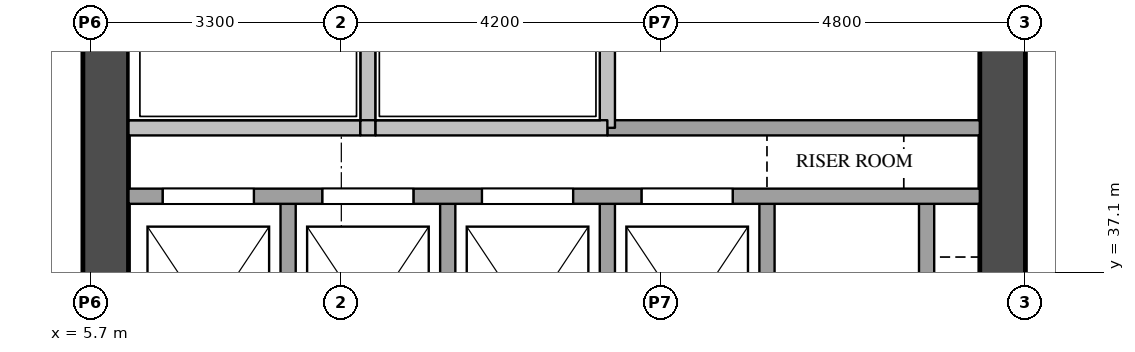
"""IFC4 building model, lengths in metres.
Left out: names, types, materials, properties, quantities, classifications, styles, units other than length and angle.
Written with IfcOpenShell. Run it as: python <this file> out.ifc"""

import sys

from ifc_helpers import new_model, si_unit, direction, frame, frame_2d, origin, place, context, subcontext, project, spatial, rectangle, extrude, element, fill, save


model = new_model("IFC4")
c1 = context("Model", 3, precision=1e-05, world=origin(), true_north=direction((0.0, 1.0)))
c2 = subcontext(c1, "Body", "Model", "MODEL_VIEW")
j1 = project(units=[si_unit("LENGTHUNIT", "METRE"), si_unit("PLANEANGLEUNIT", "RADIAN")], contexts=[c1])
p1 = place(None, origin())
s1 = spatial("IfcSite", under=j1, at=p1, CompositionType="ELEMENT")
p2 = place(p1, origin())
s2 = spatial("IfcBuilding", under=s1, at=p2, CompositionType="ELEMENT")
p3 = place(p2, frame((0.0, 0.0, 108.2)))
s3 = spatial("IfcBuildingStorey", under=s2, at=p3, CompositionType="ELEMENT", Elevation=108.2)
p4 = place(p3, frame((5.9, 29.1, 0.0), z_axis=(0.0, 0.0, 1.0), x_axis=(0.0, 1.0, 0.0)))
e1 = element("IfcWall", 1, at=p4, inside=s3, PredefinedType="SHEAR", context=c2, shape_type="SweptSolid", body=[
    extrude(rectangle(XDim=20.3, YDim=0.6, at=frame_2d((10.15, 0.0))), origin(), (0.0, 0.0, 1.0), 3.5),
])
p5 = place(p4, frame((3.6, 0.0, 0.0)))
e2 = element("IfcOpeningElement", 2, at=p5, cuts=e1, PredefinedType="OPENING", context=c2, shape_type="SweptSolid", body=[
    extrude(rectangle(XDim=1.8, YDim=2.1, at=frame_2d((0.9, 1.05))), frame((0.0, 0.31, 0.0), z_axis=(0.0, -1.0, 0.0), x_axis=(1.0, 0.0, 0.0)), (0.0, 0.0, 1.0), 0.62),
])
p6 = place(p4, frame((16.4, 0.0, 0.0)))
e3 = element("IfcOpeningElement", 3, at=p6, cuts=e1, PredefinedType="OPENING", context=c2, shape_type="SweptSolid", body=[
    extrude(rectangle(XDim=1.0, YDim=2.1, at=frame_2d((0.5, 1.05))), frame((0.0, 0.31, 0.0), z_axis=(0.0, -1.0, 0.0), x_axis=(1.0, 0.0, 0.0)), (0.0, 0.0, 1.0), 0.62),
])
p7 = place(p3, frame((17.7, 29.1, 0.0), z_axis=(0.0, 0.0, 1.0), x_axis=(0.0, 1.0, 0.0)))
e4 = element("IfcWall", 4, at=p7, inside=s3, PredefinedType="SHEAR", context=c2, shape_type="SweptSolid", body=[
    extrude(rectangle(XDim=20.3, YDim=0.6, at=frame_2d((10.15, 0.0))), origin(), (0.0, 0.0, 1.0), 3.5),
])
p8 = place(p7, frame((1.25, 0.0, 0.0)))
e5 = element("IfcOpeningElement", 5, at=p8, cuts=e4, PredefinedType="OPENING", context=c2, shape_type="SweptSolid", body=[
    extrude(rectangle(XDim=0.7, YDim=2.1, at=frame_2d((0.35, 1.05))), frame((0.0, 0.31, 0.0), z_axis=(0.0, -1.0, 0.0), x_axis=(1.0, 0.0, 0.0)), (0.0, 0.0, 1.0), 0.62),
])
p9 = place(p7, frame((7.05, 0.0, 0.0)))
e6 = element("IfcOpeningElement", 6, at=p9, cuts=e4, PredefinedType="OPENING", context=c2, shape_type="SweptSolid", body=[
    extrude(rectangle(XDim=0.7, YDim=2.1, at=frame_2d((0.35, 1.05))), frame((0.0, 0.31, 0.0), z_axis=(0.0, -1.0, 0.0), x_axis=(1.0, 0.0, 0.0)), (0.0, 0.0, 1.0), 0.62),
])
p10 = place(p3, frame((8.3, 34.9, 0.0), z_axis=(0.0, 0.0, 1.0), x_axis=(0.0, 1.0, 0.0)))
e7 = element("IfcWall", 7, at=p10, inside=s3, PredefinedType="SOLIDWALL", context=c2, shape_type="SweptSolid", body=[
    extrude(rectangle(XDim=3.2, YDim=0.2, at=frame_2d((1.6, 0.0))), origin(), (0.0, 0.0, 1.0), 3.5),
])
p11 = place(p3, frame((9.35, 39.0, 0.0), z_axis=(0.0, 0.0, 1.0), x_axis=(0.0, 1.0, 0.0)))
e8 = element("IfcWall", 8, at=p11, inside=s3, PredefinedType="SOLIDWALL", context=c2, shape_type="SweptSolid", body=[
    extrude(rectangle(XDim=1.9, YDim=0.2, at=frame_2d((0.95, 0.0))), origin(), (0.0, 0.0, 1.0), 3.5),
])
for number, where, z_axis, x_axis in (
    (9, (10.4, 34.9, 0.0), (0.0, 0.0, 1.0), (0.0, 1.0, 0.0)),
    (10, (12.5, 34.9, 0.0), (0.0, 0.0, 1.0), (0.0, 1.0, 0.0)),
):
    element("IfcWall", number, at=place(p3, frame(where, z_axis=z_axis, x_axis=x_axis)), inside=s3, PredefinedType="SOLIDWALL", context=c2, shape_type="SweptSolid", body=[
        extrude(rectangle(XDim=3.2, YDim=0.2, at=frame_2d((1.6, 0.0))), origin(), (0.0, 0.0, 1.0), 3.5),
    ])
p12 = place(p3, frame((12.5, 39.0, 0.0), z_axis=(0.0, 0.0, 1.0), x_axis=(0.0, 1.0, 0.0)))
e11 = element("IfcWall", 11, at=p12, inside=s3, PredefinedType="SOLIDWALL", context=c2, shape_type="SweptSolid", body=[
    extrude(rectangle(XDim=1.9, YDim=0.2, at=frame_2d((0.95, 0.0))), origin(), (0.0, 0.0, 1.0), 3.5),
])
for number, where, z_axis, x_axis in (
    (12, (14.6, 34.9, 0.0), (0.0, 0.0, 1.0), (0.0, 1.0, 0.0)),
    (13, (16.7, 34.9, 0.0), (0.0, 0.0, 1.0), (0.0, 1.0, 0.0)),
):
    element("IfcWall", number, at=place(p3, frame(where, z_axis=z_axis, x_axis=x_axis)), inside=s3, PredefinedType="SOLIDWALL", context=c2, shape_type="SweptSolid", body=[
        extrude(rectangle(XDim=3.2, YDim=0.2, at=frame_2d((1.6, 0.0))), origin(), (0.0, 0.0, 1.0), 3.5),
    ])
p13 = place(p3, frame((6.2, 38.1, 0.0), z_axis=(0.0, 0.0, 1.0), x_axis=(1.0, 0.0, 0.0)))
e14 = element("IfcWall", 14, at=p13, inside=s3, PredefinedType="SOLIDWALL", context=c2, shape_type="SweptSolid", body=[
    extrude(rectangle(XDim=11.2, YDim=0.2, at=frame_2d((5.6, 0.0))), origin(), (0.0, 0.0, 1.0), 3.5),
])
p14 = place(p13, frame((0.45, 0.0, 0.0)))
e15 = element("IfcOpeningElement", 15, at=p14, cuts=e14, PredefinedType="OPENING", context=c2, shape_type="SweptSolid", body=[
    extrude(rectangle(XDim=1.2, YDim=2.1, at=frame_2d((0.6, 1.05))), frame((0.0, 0.11, 0.0), z_axis=(0.0, -1.0, 0.0), x_axis=(1.0, 0.0, 0.0)), (0.0, 0.0, 1.0), 0.22),
])
p15 = place(p13, frame((2.55, 0.0, 0.0)))
e16 = element("IfcOpeningElement", 16, at=p15, cuts=e14, PredefinedType="OPENING", context=c2, shape_type="SweptSolid", body=[
    extrude(rectangle(XDim=1.2, YDim=2.1, at=frame_2d((0.6, 1.05))), frame((0.0, 0.11, 0.0), z_axis=(0.0, -1.0, 0.0), x_axis=(1.0, 0.0, 0.0)), (0.0, 0.0, 1.0), 0.22),
])
p16 = place(p13, frame((4.65, 0.0, 0.0)))
e17 = element("IfcOpeningElement", 17, at=p16, cuts=e14, PredefinedType="OPENING", context=c2, shape_type="SweptSolid", body=[
    extrude(rectangle(XDim=1.2, YDim=2.1, at=frame_2d((0.6, 1.05))), frame((0.0, 0.11, 0.0), z_axis=(0.0, -1.0, 0.0), x_axis=(1.0, 0.0, 0.0)), (0.0, 0.0, 1.0), 0.22),
])
p17 = place(p13, frame((6.75, 0.0, 0.0)))
e18 = element("IfcOpeningElement", 18, at=p17, cuts=e14, PredefinedType="OPENING", context=c2, shape_type="SweptSolid", body=[
    extrude(rectangle(XDim=1.2, YDim=2.1, at=frame_2d((0.6, 1.05))), frame((0.0, 0.11, 0.0), z_axis=(0.0, -1.0, 0.0), x_axis=(1.0, 0.0, 0.0)), (0.0, 0.0, 1.0), 0.22),
])
p18 = place(p3, frame((12.5, 39.0, 0.0), z_axis=(0.0, 0.0, 1.0), x_axis=(1.0, 0.0, 0.0)))
e19 = element("IfcWall", 19, at=p18, inside=s3, PredefinedType="SOLIDWALL", context=c2, shape_type="SweptSolid", body=[
    extrude(rectangle(XDim=4.9, YDim=0.2, at=frame_2d((2.45, 0.0))), origin(), (0.0, 0.0, 1.0), 3.5),
])
p19 = place(p3, frame((6.2, 39.0, 0.0), z_axis=(0.0, 0.0, 1.0), x_axis=(1.0, 0.0, 0.0)))
e20 = element("IfcWall", 20, at=p19, inside=s3, PredefinedType="SOLIDWALL", context=c2, shape_type="SweptSolid", body=[
    extrude(rectangle(XDim=3.05, YDim=0.2, at=frame_2d((1.525, 0.0))), origin(), (0.0, 0.0, 1.0), 3.5),
])
p20 = place(p3, frame((9.25, 39.0, 0.0), z_axis=(0.0, 0.0, 1.0), x_axis=(1.0, 0.0, 0.0)))
e21 = element("IfcWall", 21, at=p20, inside=s3, PredefinedType="SOLIDWALL", context=c2, shape_type="SweptSolid", body=[
    extrude(rectangle(XDim=0.2, YDim=0.2, at=frame_2d((0.1, 0.0))), origin(), (0.0, 0.0, 1.0), 3.5),
])
p21 = place(p3, frame((9.45, 39.0, 0.0), z_axis=(0.0, 0.0, 1.0), x_axis=(1.0, 0.0, 0.0)))
e22 = element("IfcWall", 22, at=p21, inside=s3, PredefinedType="SOLIDWALL", context=c2, shape_type="SweptSolid", body=[
    extrude(rectangle(XDim=3.05, YDim=0.2, at=frame_2d((1.525, 0.0))), origin(), (0.0, 0.0, 1.0), 3.5),
])
p22 = place(p14, origin())
e23 = element("IfcDoor", 23, at=p22, inside=s3, OperationType="SLIDING_TO_LEFT", PredefinedType="DOOR", context=c2, shape_type="SweptSolid", body=[
    extrude(rectangle(XDim=1.2, YDim=2.1, at=frame_2d((0.6, 1.05))), frame((0.0, 0.025, 0.0), z_axis=(0.0, -1.0, 0.0), x_axis=(1.0, 0.0, 0.0)), (0.0, 0.0, 1.0), 0.05),
])
fill(e15, e23)
p23 = place(p15, origin())
e24 = element("IfcDoor", 24, at=p23, inside=s3, OperationType="SLIDING_TO_LEFT", PredefinedType="DOOR", context=c2, shape_type="SweptSolid", body=[
    extrude(rectangle(XDim=1.2, YDim=2.1, at=frame_2d((0.6, 1.05))), frame((0.0, 0.025, 0.0), z_axis=(0.0, -1.0, 0.0), x_axis=(1.0, 0.0, 0.0)), (0.0, 0.0, 1.0), 0.05),
])
fill(e16, e24)
p24 = place(p16, origin())
e25 = element("IfcDoor", 25, at=p24, inside=s3, OperationType="SLIDING_TO_LEFT", PredefinedType="DOOR", context=c2, shape_type="SweptSolid", body=[
    extrude(rectangle(XDim=1.2, YDim=2.1, at=frame_2d((0.6, 1.05))), frame((0.0, 0.025, 0.0), z_axis=(0.0, -1.0, 0.0), x_axis=(1.0, 0.0, 0.0)), (0.0, 0.0, 1.0), 0.05),
])
fill(e17, e25)
p25 = place(p17, origin())
e26 = element("IfcDoor", 26, at=p25, inside=s3, OperationType="SLIDING_TO_LEFT", PredefinedType="DOOR", context=c2, shape_type="SweptSolid", body=[
    extrude(rectangle(XDim=1.2, YDim=2.1, at=frame_2d((0.6, 1.05))), frame((0.0, 0.025, 0.0), z_axis=(0.0, -1.0, 0.0), x_axis=(1.0, 0.0, 0.0)), (0.0, 0.0, 1.0), 0.05),
])
fill(e18, e26)
save(model, sys.argv[1])
